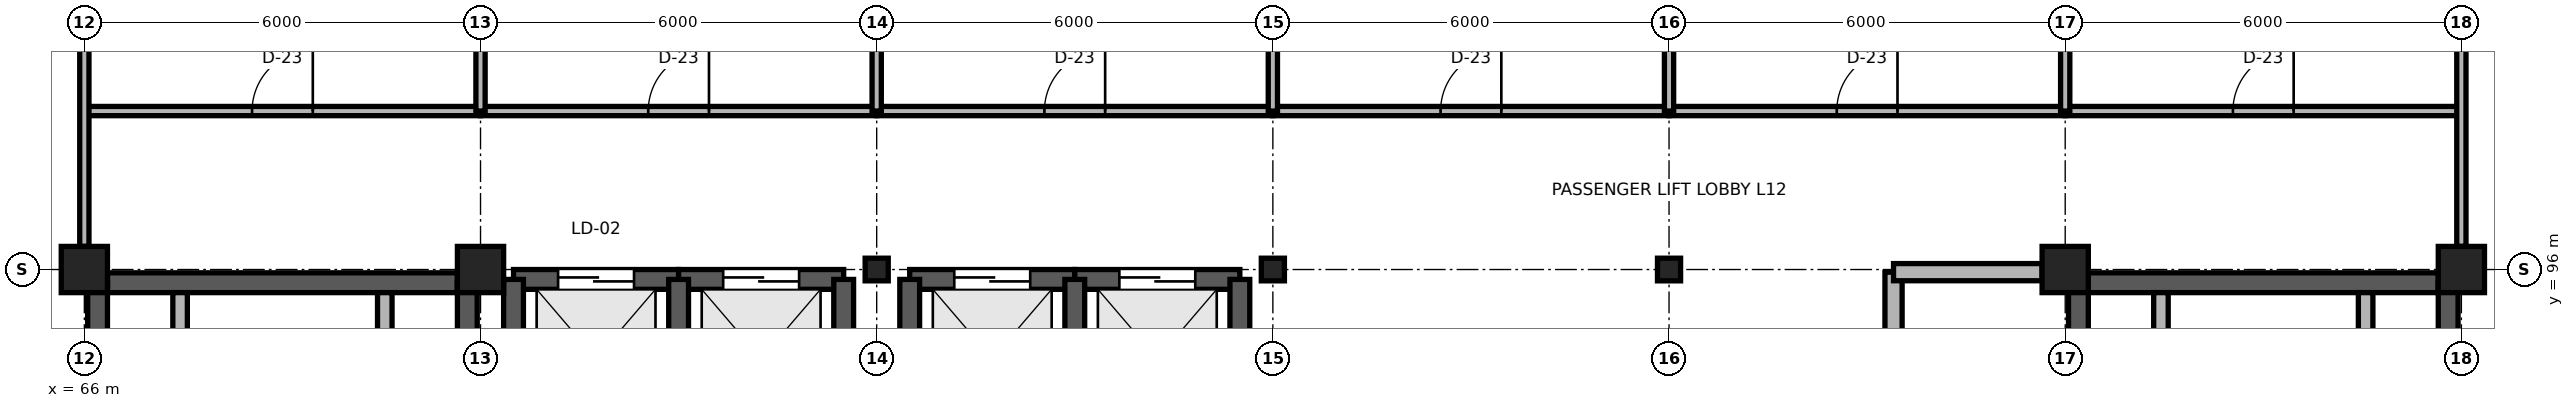
"""IFC4 building model, lengths in metres.
Left out: names, types, materials, properties, quantities, classifications, styles, units other than length and angle.
Written with IfcOpenShell. Run it as: python <this file> out.ifc"""

import sys

from ifc_helpers import new_model, si_unit, direction, frame, frame_2d, origin, origin_2d, place, context, subcontext, project, spatial, rectangle, i_section, extrude, element, fill, save


model = new_model("IFC4")
c1 = context("Model", 3, precision=1e-05, world=origin(), true_north=direction((0.0, 1.0)))
c2 = subcontext(c1, "Body", "Model", "MODEL_VIEW")
j1 = project(units=[si_unit("LENGTHUNIT", "METRE"), si_unit("PLANEANGLEUNIT", "RADIAN")], contexts=[c1])
p1 = place(None, origin())
s1 = spatial("IfcSite", under=j1, at=p1, CompositionType="ELEMENT")
p2 = place(p1, origin())
s2 = spatial("IfcBuilding", under=s1, at=p2, CompositionType="ELEMENT")
p3 = place(p2, frame((0.0, 0.0, 48.3)))
s3 = spatial("IfcBuildingStorey", under=s2, at=p3, CompositionType="ELEMENT", Elevation=48.3)
for number, where, z_axis, x_axis in (
    (1, (66.0, 96.0, 0.0), (0.0, 0.0, 1.0), (1.0, 0.0, 0.0)),
    (2, (72.0, 96.0, 0.0), (0.0, 0.0, 1.0), (1.0, 0.0, 0.0)),
):
    element("IfcColumn", number, at=place(p3, frame(where, z_axis=z_axis, x_axis=x_axis)), inside=s3, PredefinedType="COLUMN", context=c2, shape_type="SweptSolid", body=[
        extrude(rectangle(XDim=0.7, YDim=0.7, at=origin_2d()), origin(), (0.0, 0.0, 1.0), 3.9),
    ])
for number, where, z_axis, x_axis in (
    (3, (78.0, 96.0, 0.0), (0.0, 0.0, 1.0), (1.0, 0.0, 0.0)),
    (4, (84.0, 96.0, 0.0), (0.0, 0.0, 1.0), (1.0, 0.0, 0.0)),
    (5, (90.0, 96.0, 0.0), (0.0, 0.0, 1.0), (1.0, 0.0, 0.0)),
):
    element("IfcColumn", number, at=place(p3, frame(where, z_axis=z_axis, x_axis=x_axis)), inside=s3, PredefinedType="COLUMN", context=c2, shape_type="SweptSolid", body=[
        extrude(i_section(OverallWidth=0.35, OverallDepth=0.343, WebThickness=0.01, FlangeThickness=0.015, FilletRadius=0.02, at=origin_2d()), origin(), (0.0, 0.0, 1.0), 3.9),
    ])
for number, where, z_axis, x_axis in (
    (6, (96.0, 96.0, 0.0), (0.0, 0.0, 1.0), (1.0, 0.0, 0.0)),
    (7, (102.0, 96.0, 0.0), (0.0, 0.0, 1.0), (1.0, 0.0, 0.0)),
):
    element("IfcColumn", number, at=place(p3, frame(where, z_axis=z_axis, x_axis=x_axis)), inside=s3, PredefinedType="COLUMN", context=c2, shape_type="SweptSolid", body=[
        extrude(rectangle(XDim=0.7, YDim=0.7, at=origin_2d()), origin(), (0.0, 0.0, 1.0), 3.9),
    ])
p4 = place(p3, frame((66.35, 95.8, 0.0), z_axis=(0.0, 0.0, 1.0), x_axis=(1.0, 0.0, 0.0)))
e8 = element("IfcWall", 8, at=p4, inside=s3, PredefinedType="SHEAR", context=c2, shape_type="SweptSolid", body=[
    extrude(rectangle(XDim=5.3, YDim=0.3, at=frame_2d((2.65, 0.0))), origin(), (0.0, 0.0, 1.0), 3.74),
])
for number, where, z_axis, x_axis in (
    (9, (66.2, 84.0, 0.0), (0.0, 0.0, 1.0), (0.0, 1.0, 0.0)),
    (10, (71.8, 84.0, 0.0), (0.0, 0.0, 1.0), (0.0, 1.0, 0.0)),
):
    element("IfcWall", number, at=place(p3, frame(where, z_axis=z_axis, x_axis=x_axis)), inside=s3, PredefinedType="SHEAR", context=c2, shape_type="SweptSolid", body=[
        extrude(rectangle(XDim=11.8, YDim=0.3, at=frame_2d((5.9, 0.0))), origin(), (0.0, 0.0, 1.0), 3.74),
    ])
for number, where, z_axis, x_axis in (
    (11, (67.45, 94.4, 0.0), (0.0, 0.0, 1.0), (0.0, 1.0, 0.0)),
    (12, (70.55, 94.4, 0.0), (0.0, 0.0, 1.0), (0.0, 1.0, 0.0)),
):
    element("IfcWall", number, at=place(p3, frame(where, z_axis=z_axis, x_axis=x_axis)), inside=s3, PredefinedType="PARTITIONING", context=c2, shape_type="SweptSolid", body=[
        extrude(rectangle(XDim=1.25, YDim=0.22, at=frame_2d((0.625, 0.0))), origin(), (0.0, 0.0, 1.0), 3.74),
    ])
p5 = place(p3, frame((96.35, 95.8, 0.0), z_axis=(0.0, 0.0, 1.0), x_axis=(1.0, 0.0, 0.0)))
e13 = element("IfcWall", 13, at=p5, inside=s3, PredefinedType="SHEAR", context=c2, shape_type="SweptSolid", body=[
    extrude(rectangle(XDim=5.3, YDim=0.3, at=frame_2d((2.65, 0.0))), origin(), (0.0, 0.0, 1.0), 3.74),
])
for number, where, z_axis, x_axis in (
    (14, (96.2, 84.0, 0.0), (0.0, 0.0, 1.0), (0.0, 1.0, 0.0)),
    (15, (101.8, 84.0, 0.0), (0.0, 0.0, 1.0), (0.0, 1.0, 0.0)),
):
    element("IfcWall", number, at=place(p3, frame(where, z_axis=z_axis, x_axis=x_axis)), inside=s3, PredefinedType="SHEAR", context=c2, shape_type="SweptSolid", body=[
        extrude(rectangle(XDim=11.8, YDim=0.3, at=frame_2d((5.9, 0.0))), origin(), (0.0, 0.0, 1.0), 3.74),
    ])
for number, where, z_axis, x_axis in (
    (16, (97.45, 94.4, 0.0), (0.0, 0.0, 1.0), (0.0, 1.0, 0.0)),
    (17, (100.55, 94.4, 0.0), (0.0, 0.0, 1.0), (0.0, 1.0, 0.0)),
):
    element("IfcWall", number, at=place(p3, frame(where, z_axis=z_axis, x_axis=x_axis)), inside=s3, PredefinedType="PARTITIONING", context=c2, shape_type="SweptSolid", body=[
        extrude(rectangle(XDim=1.25, YDim=0.22, at=frame_2d((0.625, 0.0))), origin(), (0.0, 0.0, 1.0), 3.74),
    ])
p6 = place(p3, frame((72.5, 95.85, 0.0), z_axis=(0.0, 0.0, 1.0), x_axis=(1.0, 0.0, 0.0)))
e18 = element("IfcWall", 18, at=p6, inside=s3, PredefinedType="SHEAR", context=c2, shape_type="SweptSolid", body=[
    extrude(rectangle(XDim=2.5, YDim=0.3, at=frame_2d((1.25, 0.0))), origin(), (0.0, 0.0, 1.0), 3.74),
])
p7 = place(p6, frame((0.675, 0.0, 0.0)))
e19 = element("IfcOpeningElement", 19, at=p7, cuts=e18, PredefinedType="OPENING", context=c2, shape_type="SweptSolid", body=[
    extrude(rectangle(XDim=1.15, YDim=2.15, at=frame_2d((0.575, 1.075))), frame((0.0, 0.165, 0.0), z_axis=(0.0, -1.0, 0.0), x_axis=(1.0, 0.0, 0.0)), (0.0, 0.0, 1.0), 0.33),
])
p8 = place(p3, frame((72.5, 92.45, 0.0), z_axis=(0.0, 0.0, 1.0), x_axis=(0.0, 1.0, 0.0)))
e20 = element("IfcWall", 20, at=p8, inside=s3, PredefinedType="SHEAR", context=c2, shape_type="SweptSolid", body=[
    extrude(rectangle(XDim=3.4, YDim=0.3, at=frame_2d((1.7, 0.0))), origin(), (0.0, 0.0, 1.0), 3.74),
])
p9 = place(p3, frame((75.0, 95.85, 0.0), z_axis=(0.0, 0.0, 1.0), x_axis=(1.0, 0.0, 0.0)))
e21 = element("IfcWall", 21, at=p9, inside=s3, PredefinedType="SHEAR", context=c2, shape_type="SweptSolid", body=[
    extrude(rectangle(XDim=2.5, YDim=0.3, at=frame_2d((1.25, 0.0))), origin(), (0.0, 0.0, 1.0), 3.74),
])
p10 = place(p9, frame((0.675, 0.0, 0.0)))
e22 = element("IfcOpeningElement", 22, at=p10, cuts=e21, PredefinedType="OPENING", context=c2, shape_type="SweptSolid", body=[
    extrude(rectangle(XDim=1.15, YDim=2.15, at=frame_2d((0.575, 1.075))), frame((0.0, 0.165, 0.0), z_axis=(0.0, -1.0, 0.0), x_axis=(1.0, 0.0, 0.0)), (0.0, 0.0, 1.0), 0.33),
])
for number, where, z_axis, x_axis in (
    (23, (75.0, 92.45, 0.0), (0.0, 0.0, 1.0), (0.0, 1.0, 0.0)),
    (24, (77.5, 92.45, 0.0), (0.0, 0.0, 1.0), (0.0, 1.0, 0.0)),
):
    element("IfcWall", number, at=place(p3, frame(where, z_axis=z_axis, x_axis=x_axis)), inside=s3, PredefinedType="SHEAR", context=c2, shape_type="SweptSolid", body=[
        extrude(rectangle(XDim=3.4, YDim=0.3, at=frame_2d((1.7, 0.0))), origin(), (0.0, 0.0, 1.0), 3.74),
    ])
p11 = place(p3, frame((78.5, 95.85, 0.0), z_axis=(0.0, 0.0, 1.0), x_axis=(1.0, 0.0, 0.0)))
e25 = element("IfcWall", 25, at=p11, inside=s3, PredefinedType="SHEAR", context=c2, shape_type="SweptSolid", body=[
    extrude(rectangle(XDim=2.5, YDim=0.3, at=frame_2d((1.25, 0.0))), origin(), (0.0, 0.0, 1.0), 3.74),
])
p12 = place(p11, frame((0.675, 0.0, 0.0)))
e26 = element("IfcOpeningElement", 26, at=p12, cuts=e25, PredefinedType="OPENING", context=c2, shape_type="SweptSolid", body=[
    extrude(rectangle(XDim=1.15, YDim=2.15, at=frame_2d((0.575, 1.075))), frame((0.0, 0.165, 0.0), z_axis=(0.0, -1.0, 0.0), x_axis=(1.0, 0.0, 0.0)), (0.0, 0.0, 1.0), 0.33),
])
p13 = place(p3, frame((78.5, 92.45, 0.0), z_axis=(0.0, 0.0, 1.0), x_axis=(0.0, 1.0, 0.0)))
e27 = element("IfcWall", 27, at=p13, inside=s3, PredefinedType="SHEAR", context=c2, shape_type="SweptSolid", body=[
    extrude(rectangle(XDim=3.4, YDim=0.3, at=frame_2d((1.7, 0.0))), origin(), (0.0, 0.0, 1.0), 3.74),
])
p14 = place(p3, frame((81.0, 95.85, 0.0), z_axis=(0.0, 0.0, 1.0), x_axis=(1.0, 0.0, 0.0)))
e28 = element("IfcWall", 28, at=p14, inside=s3, PredefinedType="SHEAR", context=c2, shape_type="SweptSolid", body=[
    extrude(rectangle(XDim=2.5, YDim=0.3, at=frame_2d((1.25, 0.0))), origin(), (0.0, 0.0, 1.0), 3.74),
])
p15 = place(p14, frame((0.675, 0.0, 0.0)))
e29 = element("IfcOpeningElement", 29, at=p15, cuts=e28, PredefinedType="OPENING", context=c2, shape_type="SweptSolid", body=[
    extrude(rectangle(XDim=1.15, YDim=2.15, at=frame_2d((0.575, 1.075))), frame((0.0, 0.165, 0.0), z_axis=(0.0, -1.0, 0.0), x_axis=(1.0, 0.0, 0.0)), (0.0, 0.0, 1.0), 0.33),
])
for number, where, z_axis, x_axis in (
    (30, (81.0, 92.45, 0.0), (0.0, 0.0, 1.0), (0.0, 1.0, 0.0)),
    (31, (83.5, 92.45, 0.0), (0.0, 0.0, 1.0), (0.0, 1.0, 0.0)),
):
    element("IfcWall", number, at=place(p3, frame(where, z_axis=z_axis, x_axis=x_axis)), inside=s3, PredefinedType="SHEAR", context=c2, shape_type="SweptSolid", body=[
        extrude(rectangle(XDim=3.4, YDim=0.3, at=frame_2d((1.7, 0.0))), origin(), (0.0, 0.0, 1.0), 3.74),
    ])
p16 = place(p3, frame((93.4, 84.0, 0.0), z_axis=(0.0, 0.0, 1.0), x_axis=(0.0, 1.0, 0.0)))
e32 = element("IfcWall", 32, at=p16, inside=s3, PredefinedType="PARTITIONING", context=c2, shape_type="SweptSolid", body=[
    extrude(rectangle(XDim=11.96, YDim=0.26, at=frame_2d((5.98, 0.0))), origin(), (0.0, 0.0, 1.0), 3.68),
])
p17 = place(p16, frame((3.425, 0.0, 0.0)))
e33 = element("IfcOpeningElement", 33, at=p17, cuts=e32, PredefinedType="OPENING", context=c2, shape_type="SweptSolid", body=[
    extrude(rectangle(XDim=1.15, YDim=2.2, at=frame_2d((0.575, 1.1))), frame((0.0, 0.145, 0.0), z_axis=(0.0, -1.0, 0.0), x_axis=(1.0, 0.0, 0.0)), (0.0, 0.0, 1.0), 0.29),
])
p18 = place(p3, frame((93.4, 95.96, 0.0), z_axis=(0.0, 0.0, 1.0), x_axis=(1.0, 0.0, 0.0)))
e34 = element("IfcWall", 34, at=p18, inside=s3, PredefinedType="PARTITIONING", context=c2, shape_type="SweptSolid", body=[
    extrude(rectangle(XDim=2.25, YDim=0.26, at=frame_2d((1.125, 0.0))), origin(), (0.0, 0.0, 1.0), 3.288),
])
p19 = place(p3, frame((66.0, 98.4, 0.0), z_axis=(0.0, 0.0, 1.0), x_axis=(1.0, 0.0, 0.0)))
e35 = element("IfcWall", 35, at=p19, inside=s3, PredefinedType="PARTITIONING", context=c2, shape_type="SweptSolid", body=[
    extrude(rectangle(XDim=6.0, YDim=0.14, at=frame_2d((3.0, 0.0))), origin(), (0.0, 0.0, 1.0), 3.68),
])
p20 = place(p19, frame((2.54, 0.0, 0.0)))
e36 = element("IfcOpeningElement", 36, at=p20, cuts=e35, PredefinedType="OPENING", context=c2, shape_type="SweptSolid", body=[
    extrude(rectangle(XDim=0.92, YDim=2.15, at=frame_2d((0.46, 1.075))), frame((0.0, 0.085, 0.0), z_axis=(0.0, -1.0, 0.0), x_axis=(1.0, 0.0, 0.0)), (0.0, 0.0, 1.0), 0.17),
])
p21 = place(p3, frame((72.0, 98.4, 0.0), z_axis=(0.0, 0.0, 1.0), x_axis=(1.0, 0.0, 0.0)))
e37 = element("IfcWall", 37, at=p21, inside=s3, PredefinedType="PARTITIONING", context=c2, shape_type="SweptSolid", body=[
    extrude(rectangle(XDim=6.0, YDim=0.14, at=frame_2d((3.0, 0.0))), origin(), (0.0, 0.0, 1.0), 3.68),
])
p22 = place(p21, frame((2.54, 0.0, 0.0)))
e38 = element("IfcOpeningElement", 38, at=p22, cuts=e37, PredefinedType="OPENING", context=c2, shape_type="SweptSolid", body=[
    extrude(rectangle(XDim=0.92, YDim=2.15, at=frame_2d((0.46, 1.075))), frame((0.0, 0.085, 0.0), z_axis=(0.0, -1.0, 0.0), x_axis=(1.0, 0.0, 0.0)), (0.0, 0.0, 1.0), 0.17),
])
p23 = place(p3, frame((78.0, 98.4, 0.0), z_axis=(0.0, 0.0, 1.0), x_axis=(1.0, 0.0, 0.0)))
e39 = element("IfcWall", 39, at=p23, inside=s3, PredefinedType="PARTITIONING", context=c2, shape_type="SweptSolid", body=[
    extrude(rectangle(XDim=6.0, YDim=0.14, at=frame_2d((3.0, 0.0))), origin(), (0.0, 0.0, 1.0), 3.68),
])
p24 = place(p23, frame((2.54, 0.0, 0.0)))
e40 = element("IfcOpeningElement", 40, at=p24, cuts=e39, PredefinedType="OPENING", context=c2, shape_type="SweptSolid", body=[
    extrude(rectangle(XDim=0.92, YDim=2.15, at=frame_2d((0.46, 1.075))), frame((0.0, 0.085, 0.0), z_axis=(0.0, -1.0, 0.0), x_axis=(1.0, 0.0, 0.0)), (0.0, 0.0, 1.0), 0.17),
])
p25 = place(p3, frame((84.0, 98.4, 0.0), z_axis=(0.0, 0.0, 1.0), x_axis=(1.0, 0.0, 0.0)))
e41 = element("IfcWall", 41, at=p25, inside=s3, PredefinedType="PARTITIONING", context=c2, shape_type="SweptSolid", body=[
    extrude(rectangle(XDim=6.0, YDim=0.14, at=frame_2d((3.0, 0.0))), origin(), (0.0, 0.0, 1.0), 3.68),
])
p26 = place(p25, frame((2.54, 0.0, 0.0)))
e42 = element("IfcOpeningElement", 42, at=p26, cuts=e41, PredefinedType="OPENING", context=c2, shape_type="SweptSolid", body=[
    extrude(rectangle(XDim=0.92, YDim=2.15, at=frame_2d((0.46, 1.075))), frame((0.0, 0.085, 0.0), z_axis=(0.0, -1.0, 0.0), x_axis=(1.0, 0.0, 0.0)), (0.0, 0.0, 1.0), 0.17),
])
p27 = place(p3, frame((90.0, 98.4, 0.0), z_axis=(0.0, 0.0, 1.0), x_axis=(1.0, 0.0, 0.0)))
e43 = element("IfcWall", 43, at=p27, inside=s3, PredefinedType="PARTITIONING", context=c2, shape_type="SweptSolid", body=[
    extrude(rectangle(XDim=6.0, YDim=0.14, at=frame_2d((3.0, 0.0))), origin(), (0.0, 0.0, 1.0), 3.68),
])
p28 = place(p27, frame((2.54, 0.0, 0.0)))
e44 = element("IfcOpeningElement", 44, at=p28, cuts=e43, PredefinedType="OPENING", context=c2, shape_type="SweptSolid", body=[
    extrude(rectangle(XDim=0.92, YDim=2.15, at=frame_2d((0.46, 1.075))), frame((0.0, 0.085, 0.0), z_axis=(0.0, -1.0, 0.0), x_axis=(1.0, 0.0, 0.0)), (0.0, 0.0, 1.0), 0.17),
])
p29 = place(p3, frame((96.0, 98.4, 0.0), z_axis=(0.0, 0.0, 1.0), x_axis=(1.0, 0.0, 0.0)))
e45 = element("IfcWall", 45, at=p29, inside=s3, PredefinedType="PARTITIONING", context=c2, shape_type="SweptSolid", body=[
    extrude(rectangle(XDim=6.0, YDim=0.14, at=frame_2d((3.0, 0.0))), origin(), (0.0, 0.0, 1.0), 3.68),
])
p30 = place(p29, frame((2.54, 0.0, 0.0)))
e46 = element("IfcOpeningElement", 46, at=p30, cuts=e45, PredefinedType="OPENING", context=c2, shape_type="SweptSolid", body=[
    extrude(rectangle(XDim=0.92, YDim=2.15, at=frame_2d((0.46, 1.075))), frame((0.0, 0.085, 0.0), z_axis=(0.0, -1.0, 0.0), x_axis=(1.0, 0.0, 0.0)), (0.0, 0.0, 1.0), 0.17),
])
for number, where, z_axis, x_axis in (
    (47, (72.0, 98.4, 0.0), (0.0, 0.0, 1.0), (0.0, 1.0, 0.0)),
    (48, (78.0, 98.4, 0.0), (0.0, 0.0, 1.0), (0.0, 1.0, 0.0)),
    (49, (84.0, 98.4, 0.0), (0.0, 0.0, 1.0), (0.0, 1.0, 0.0)),
    (50, (90.0, 98.4, 0.0), (0.0, 0.0, 1.0), (0.0, 1.0, 0.0)),
    (51, (96.0, 98.4, 0.0), (0.0, 0.0, 1.0), (0.0, 1.0, 0.0)),
):
    element("IfcWall", number, at=place(p3, frame(where, z_axis=z_axis, x_axis=x_axis)), inside=s3, PredefinedType="PARTITIONING", context=c2, shape_type="SweptSolid", body=[
        extrude(rectangle(XDim=2.95, YDim=0.14, at=frame_2d((1.475, 0.0))), origin(), (0.0, 0.0, 1.0), 3.288),
    ])
for number, where, z_axis, x_axis in (
    (52, (66.0, 96.35, 0.0), (0.0, 0.0, 1.0), (0.0, 1.0, 0.0)),
    (53, (102.0, 96.35, 0.0), (0.0, 0.0, 1.0), (0.0, 1.0, 0.0)),
):
    element("IfcWall", number, at=place(p3, frame(where, z_axis=z_axis, x_axis=x_axis)), inside=s3, PredefinedType="PARTITIONING", context=c2, shape_type="SweptSolid", body=[
        extrude(rectangle(XDim=5.3, YDim=0.14, at=frame_2d((2.65, 0.0))), origin(), (0.0, 0.0, 1.0), 3.288),
    ])
p31 = place(p7, origin())
e54 = element("IfcDoor", 54, at=p31, inside=s3, OperationType="DOUBLE_DOOR_SLIDING", PredefinedType="DOOR", context=c2, shape_type="SweptSolid", body=[
    extrude(rectangle(XDim=1.15, YDim=2.15, at=frame_2d((0.575, 1.075))), frame((0.0, 0.025, 0.0), z_axis=(0.0, -1.0, 0.0), x_axis=(1.0, 0.0, 0.0)), (0.0, 0.0, 1.0), 0.05),
])
fill(e19, e54)
p32 = place(p10, origin())
e55 = element("IfcDoor", 55, at=p32, inside=s3, OperationType="DOUBLE_DOOR_SLIDING", PredefinedType="DOOR", context=c2, shape_type="SweptSolid", body=[
    extrude(rectangle(XDim=1.15, YDim=2.15, at=frame_2d((0.575, 1.075))), frame((0.0, 0.025, 0.0), z_axis=(0.0, -1.0, 0.0), x_axis=(1.0, 0.0, 0.0)), (0.0, 0.0, 1.0), 0.05),
])
fill(e22, e55)
p33 = place(p12, origin())
e56 = element("IfcDoor", 56, at=p33, inside=s3, OperationType="DOUBLE_DOOR_SLIDING", PredefinedType="DOOR", context=c2, shape_type="SweptSolid", body=[
    extrude(rectangle(XDim=1.15, YDim=2.15, at=frame_2d((0.575, 1.075))), frame((0.0, 0.025, 0.0), z_axis=(0.0, -1.0, 0.0), x_axis=(1.0, 0.0, 0.0)), (0.0, 0.0, 1.0), 0.05),
])
fill(e26, e56)
p34 = place(p15, origin())
e57 = element("IfcDoor", 57, at=p34, inside=s3, OperationType="DOUBLE_DOOR_SLIDING", PredefinedType="DOOR", context=c2, shape_type="SweptSolid", body=[
    extrude(rectangle(XDim=1.15, YDim=2.15, at=frame_2d((0.575, 1.075))), frame((0.0, 0.025, 0.0), z_axis=(0.0, -1.0, 0.0), x_axis=(1.0, 0.0, 0.0)), (0.0, 0.0, 1.0), 0.05),
])
fill(e29, e57)
p35 = place(p20, origin())
e58 = element("IfcDoor", 58, at=p35, inside=s3, OperationType="SINGLE_SWING_RIGHT", PredefinedType="DOOR", context=c2, shape_type="SweptSolid", body=[
    extrude(rectangle(XDim=0.92, YDim=2.15, at=frame_2d((0.46, 1.075))), frame((0.0, 0.025, 0.0), z_axis=(0.0, -1.0, 0.0), x_axis=(1.0, 0.0, 0.0)), (0.0, 0.0, 1.0), 0.05),
])
fill(e36, e58)
p36 = place(p22, origin())
e59 = element("IfcDoor", 59, at=p36, inside=s3, OperationType="SINGLE_SWING_RIGHT", PredefinedType="DOOR", context=c2, shape_type="SweptSolid", body=[
    extrude(rectangle(XDim=0.92, YDim=2.15, at=frame_2d((0.46, 1.075))), frame((0.0, 0.025, 0.0), z_axis=(0.0, -1.0, 0.0), x_axis=(1.0, 0.0, 0.0)), (0.0, 0.0, 1.0), 0.05),
])
fill(e38, e59)
p37 = place(p24, origin())
e60 = element("IfcDoor", 60, at=p37, inside=s3, OperationType="SINGLE_SWING_RIGHT", PredefinedType="DOOR", context=c2, shape_type="SweptSolid", body=[
    extrude(rectangle(XDim=0.92, YDim=2.15, at=frame_2d((0.46, 1.075))), frame((0.0, 0.025, 0.0), z_axis=(0.0, -1.0, 0.0), x_axis=(1.0, 0.0, 0.0)), (0.0, 0.0, 1.0), 0.05),
])
fill(e40, e60)
p38 = place(p26, origin())
e61 = element("IfcDoor", 61, at=p38, inside=s3, OperationType="SINGLE_SWING_RIGHT", PredefinedType="DOOR", context=c2, shape_type="SweptSolid", body=[
    extrude(rectangle(XDim=0.92, YDim=2.15, at=frame_2d((0.46, 1.075))), frame((0.0, 0.025, 0.0), z_axis=(0.0, -1.0, 0.0), x_axis=(1.0, 0.0, 0.0)), (0.0, 0.0, 1.0), 0.05),
])
fill(e42, e61)
p39 = place(p28, origin())
e62 = element("IfcDoor", 62, at=p39, inside=s3, OperationType="SINGLE_SWING_RIGHT", PredefinedType="DOOR", context=c2, shape_type="SweptSolid", body=[
    extrude(rectangle(XDim=0.92, YDim=2.15, at=frame_2d((0.46, 1.075))), frame((0.0, 0.025, 0.0), z_axis=(0.0, -1.0, 0.0), x_axis=(1.0, 0.0, 0.0)), (0.0, 0.0, 1.0), 0.05),
])
fill(e44, e62)
p40 = place(p30, origin())
e63 = element("IfcDoor", 63, at=p40, inside=s3, OperationType="SINGLE_SWING_RIGHT", PredefinedType="DOOR", context=c2, shape_type="SweptSolid", body=[
    extrude(rectangle(XDim=0.92, YDim=2.15, at=frame_2d((0.46, 1.075))), frame((0.0, 0.025, 0.0), z_axis=(0.0, -1.0, 0.0), x_axis=(1.0, 0.0, 0.0)), (0.0, 0.0, 1.0), 0.05),
])
fill(e46, e63)
save(model, sys.argv[1])
